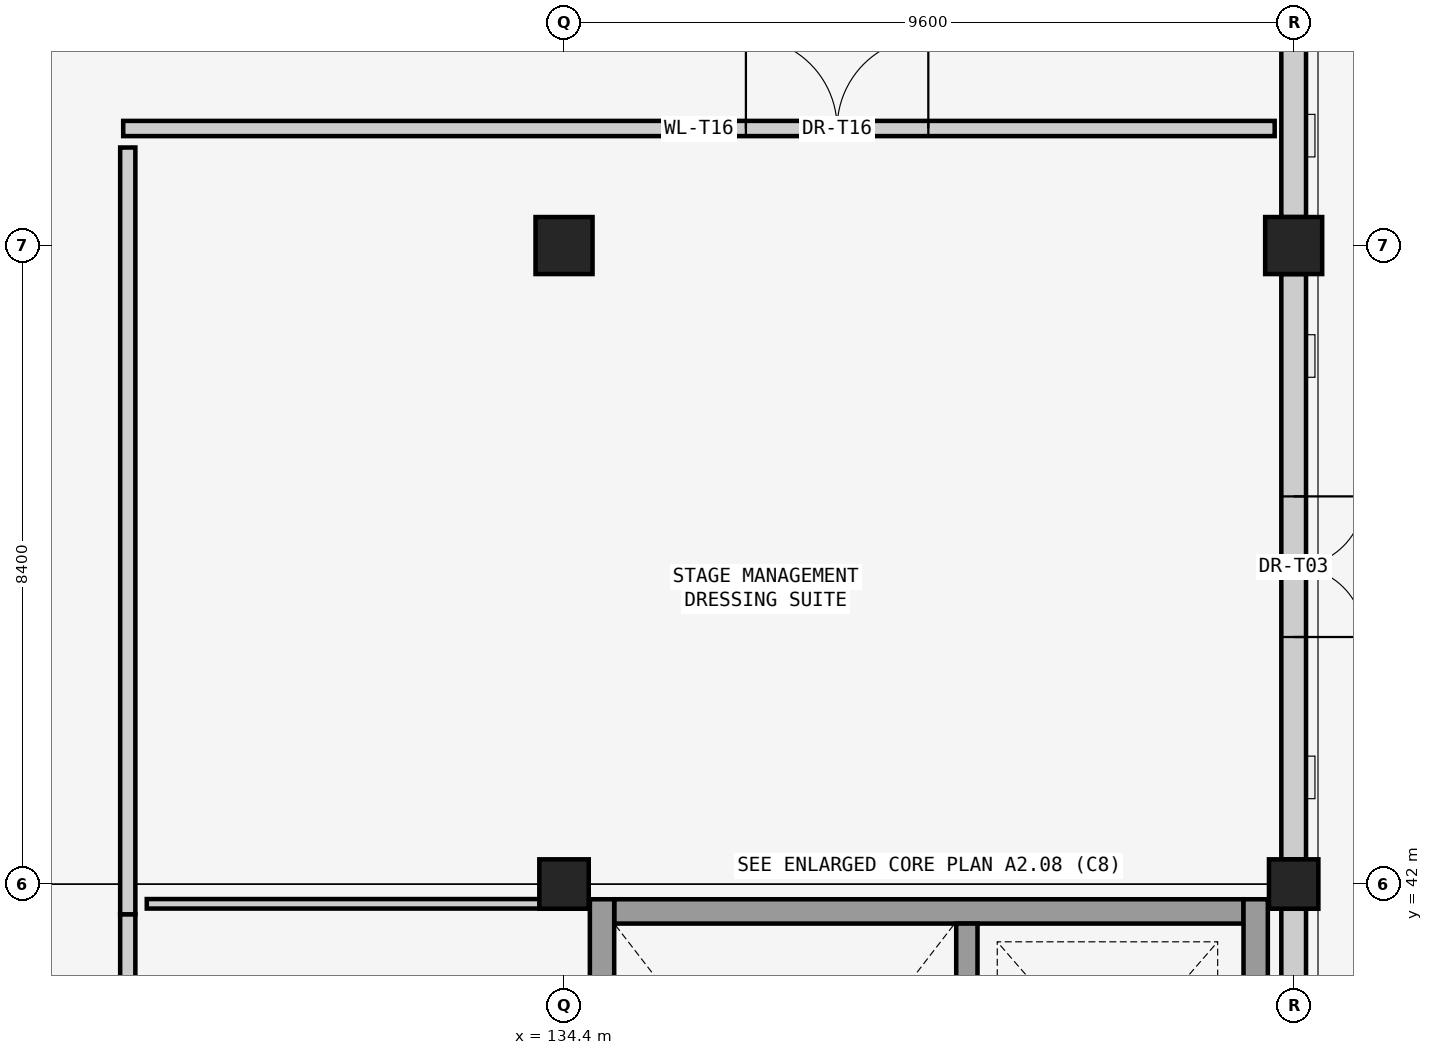
"""IFC4 building model, lengths in metres.
Left out: names, types, materials, properties, quantities, classifications, styles, units other than length and angle.
Written with IfcOpenShell. Run it as: python <this file> out.ifc"""

import sys

from ifc_helpers import new_model, si_unit, direction, frame, frame_2d, origin, origin_2d, place, context, subcontext, project, spatial, rectangle, extrude, element, fill, save


model = new_model("IFC4")
c1 = context("Model", 3, precision=1e-05, world=origin(), true_north=direction((0.0, 1.0)))
c2 = subcontext(c1, "Body", "Model", "MODEL_VIEW")
j1 = project(units=[si_unit("LENGTHUNIT", "METRE"), si_unit("PLANEANGLEUNIT", "RADIAN")], contexts=[c1])
p1 = place(None, origin())
s1 = spatial("IfcSite", under=j1, at=p1, CompositionType="ELEMENT")
p2 = place(p1, origin())
s2 = spatial("IfcBuilding", under=s1, at=p2, CompositionType="ELEMENT")
p3 = place(p2, frame((0.0, 0.0, 10.2)))
s3 = spatial("IfcBuildingStorey", under=s2, at=p3, CompositionType="ELEMENT", Elevation=10.2)
p4 = place(p3, frame((134.4, 42.0, 0.0), z_axis=(0.0, 0.0, 1.0), x_axis=(1.0, 0.0, 0.0)))
e1 = element("IfcColumn", 1, at=p4, inside=s3, PredefinedType="COLUMN", context=c2, shape_type="SweptSolid", body=[
    extrude(rectangle(XDim=0.65, YDim=0.65, at=origin_2d()), origin(), (0.0, 0.0, 1.0), 4.56),
])
p5 = place(p3, frame((134.4, 50.4, 0.0), z_axis=(0.0, 0.0, 1.0), x_axis=(1.0, 0.0, 0.0)))
e2 = element("IfcColumn", 2, at=p5, inside=s3, PredefinedType="COLUMN", context=c2, shape_type="SweptSolid", body=[
    extrude(rectangle(XDim=0.75, YDim=0.75, at=origin_2d()), origin(), (0.0, 0.0, 1.0), 4.56),
])
p6 = place(p3, frame((144.0, 42.0, 0.0), z_axis=(0.0, 0.0, 1.0), x_axis=(1.0, 0.0, 0.0)))
e3 = element("IfcColumn", 3, at=p6, inside=s3, PredefinedType="COLUMN", context=c2, shape_type="SweptSolid", body=[
    extrude(rectangle(XDim=0.65, YDim=0.65, at=origin_2d()), origin(), (0.0, 0.0, 1.0), 4.56),
])
p7 = place(p3, frame((144.0, 50.4, 0.0), z_axis=(0.0, 0.0, 1.0), x_axis=(1.0, 0.0, 0.0)))
e4 = element("IfcColumn", 4, at=p7, inside=s3, PredefinedType="COLUMN", context=c2, shape_type="SweptSolid", body=[
    extrude(rectangle(XDim=0.75, YDim=0.75, at=origin_2d()), origin(), (0.0, 0.0, 1.0), 4.56),
])
p8 = place(p3, frame((144.0, 41.675, 0.0), z_axis=(0.0, 0.0, 1.0), x_axis=(0.0, -1.0, 0.0)))
e5 = element("IfcWall", 5, at=p8, inside=s3, PredefinedType="SOLIDWALL", context=c2, shape_type="SweptSolid", body=[
    extrude(rectangle(XDim=7.75, YDim=0.325, at=frame_2d((3.875, 0.0))), origin(), (0.0, 0.0, 1.0), 4.208),
])
p9 = place(p3, frame((144.0, 50.025, 0.0), z_axis=(0.0, 0.0, 1.0), x_axis=(0.0, -1.0, 0.0)))
e6 = element("IfcWall", 6, at=p9, inside=s3, PredefinedType="SOLIDWALL", context=c2, shape_type="SweptSolid", body=[
    extrude(rectangle(XDim=7.7, YDim=0.325, at=frame_2d((3.85, 0.0))), origin(), (0.0, 0.0, 1.0), 4.208),
])
p10 = place(p9, frame((2.925, 0.0, 0.0)))
e7 = element("IfcOpeningElement", 7, at=p10, cuts=e6, PredefinedType="OPENING", context=c2, shape_type="SweptSolid", body=[
    extrude(rectangle(XDim=1.85, YDim=2.3, at=frame_2d((0.925, 1.15))), frame((0.0, 0.172, 0.0), z_axis=(0.0, -1.0, 0.0), x_axis=(1.0, 0.0, 0.0)), (0.0, 0.0, 1.0), 0.345),
])
p11 = place(p3, frame((144.0, 58.425, 0.0), z_axis=(0.0, 0.0, 1.0), x_axis=(0.0, -1.0, 0.0)))
e8 = element("IfcWall", 8, at=p11, inside=s3, PredefinedType="SOLIDWALL", context=c2, shape_type="SweptSolid", body=[
    extrude(rectangle(XDim=7.65, YDim=0.325, at=frame_2d((3.825, 0.0))), origin(), (0.0, 0.0, 1.0), 4.208),
])
p12 = place(p11, frame((2.9, 0.0, 0.0)))
e9 = element("IfcOpeningElement", 9, at=p12, cuts=e8, PredefinedType="OPENING", context=c2, shape_type="SweptSolid", body=[
    extrude(rectangle(XDim=1.85, YDim=2.3, at=frame_2d((0.925, 1.15))), frame((0.0, 0.172, 0.0), z_axis=(0.0, -1.0, 0.0), x_axis=(1.0, 0.0, 0.0)), (0.0, 0.0, 1.0), 0.345),
])
p13 = place(p3, frame((143.34, 41.64, 0.0), z_axis=(0.0, 0.0, 1.0), x_axis=(-1.0, 0.0, 0.0)))
e10 = element("IfcWall", 10, at=p13, inside=s3, PredefinedType="SHEAR", context=c2, shape_type="SweptSolid", body=[
    extrude(rectangle(XDim=8.28, YDim=0.32, at=frame_2d((4.14, 0.0))), origin(), (0.0, 0.0, 1.0), 4.54),
])
for number, where, z_axis, x_axis in (
    (11, (134.9, 41.8, 0.0), (0.0, 0.0, 1.0), (0.0, -1.0, 0.0)),
    (12, (143.5, 33.44, 0.0), (0.0, 0.0, 1.0), (0.0, 1.0, 0.0)),
):
    element("IfcWall", number, at=place(p3, frame(where, z_axis=z_axis, x_axis=x_axis)), inside=s3, PredefinedType="SHEAR", context=c2, shape_type="SweptSolid", body=[
        extrude(rectangle(XDim=8.36, YDim=0.32, at=frame_2d((4.18, 0.0))), origin(), (0.0, 0.0, 1.0), 4.54),
    ])
p14 = place(p3, frame((139.7, 33.76, 0.0), z_axis=(0.0, 0.0, 1.0), x_axis=(0.0, 1.0, 0.0)))
e13 = element("IfcWall", 13, at=p14, inside=s3, PredefinedType="SHEAR", context=c2, shape_type="SweptSolid", body=[
    extrude(rectangle(XDim=7.72, YDim=0.28, at=frame_2d((3.86, 0.0))), origin(), (0.0, 0.0, 1.0), 4.54),
])
p15 = place(p3, frame((128.6, 51.94, 0.0), z_axis=(0.0, 0.0, 1.0), x_axis=(1.0, 0.0, 0.0)))
e14 = element("IfcWall", 14, at=p15, inside=s3, PredefinedType="SOLIDWALL", context=c2, shape_type="SweptSolid", body=[
    extrude(rectangle(XDim=15.15, YDim=0.2, at=frame_2d((7.575, 0.0))), origin(), (0.0, 0.0, 1.0), 4.48),
])
p16 = place(p15, frame((8.193, 0.0, 0.0)))
e15 = element("IfcOpeningElement", 15, at=p16, cuts=e14, PredefinedType="OPENING", context=c2, shape_type="SweptSolid", body=[
    extrude(rectangle(XDim=2.4, YDim=2.8, at=frame_2d((1.2, 1.4))), frame((0.0, 0.11, 0.0), z_axis=(0.0, -1.0, 0.0), x_axis=(1.0, 0.0, 0.0)), (0.0, 0.0, 1.0), 0.22),
])
p17 = place(p3, frame((128.66, 41.6, 0.0), z_axis=(0.0, 0.0, 1.0), x_axis=(0.0, 1.0, 0.0)))
e16 = element("IfcWall", 16, at=p17, inside=s3, PredefinedType="SOLIDWALL", context=c2, shape_type="SweptSolid", body=[
    extrude(rectangle(XDim=10.09, YDim=0.2, at=frame_2d((5.045, 0.0))), origin(), (0.0, 0.0, 1.0), 4.48),
])
p18 = place(p3, frame((128.66, 33.6, 0.0), z_axis=(0.0, 0.0, 1.0), x_axis=(0.0, 1.0, 0.0)))
e17 = element("IfcWall", 17, at=p18, inside=s3, PredefinedType="SOLIDWALL", context=c2, shape_type="SweptSolid", body=[
    extrude(rectangle(XDim=8.0, YDim=0.2, at=frame_2d((4.0, 0.0))), origin(), (0.0, 0.0, 1.0), 4.48),
])
p19 = place(p18, frame((3.525, 0.0, 0.0)))
e18 = element("IfcOpeningElement", 18, at=p19, cuts=e17, PredefinedType="OPENING", context=c2, shape_type="SweptSolid", body=[
    extrude(rectangle(XDim=0.95, YDim=2.15, at=frame_2d((0.475, 1.075))), frame((0.0, 0.11, 0.0), z_axis=(0.0, -1.0, 0.0), x_axis=(1.0, 0.0, 0.0)), (0.0, 0.0, 1.0), 0.22),
])
p20 = place(p3, frame((128.91, 41.74, 0.0), z_axis=(0.0, 0.0, 1.0), x_axis=(1.0, 0.0, 0.0)))
e19 = element("IfcWall", 19, at=p20, inside=s3, PredefinedType="PARTITIONING", context=c2, shape_type="SweptSolid", body=[
    extrude(rectangle(XDim=5.74, YDim=0.125, at=frame_2d((2.87, 0.0))), origin(), (0.0, 0.0, 1.0), 4.51),
])
p21 = place(p10, origin())
e20 = element("IfcDoor", 20, at=p21, inside=s3, OperationType="DOUBLE_DOOR_SINGLE_SWING", PredefinedType="DOOR", context=c2, shape_type="SweptSolid", body=[
    extrude(rectangle(XDim=1.85, YDim=2.3, at=frame_2d((0.925, 1.15))), frame((0.0, 0.025, 0.0), z_axis=(0.0, -1.0, 0.0), x_axis=(1.0, 0.0, 0.0)), (0.0, 0.0, 1.0), 0.05),
])
fill(e7, e20)
p22 = place(p16, origin())
e21 = element("IfcDoor", 21, at=p22, inside=s3, OperationType="DOUBLE_SWING_LEFT", PredefinedType="DOOR", context=c2, shape_type="SweptSolid", body=[
    extrude(rectangle(XDim=2.4, YDim=2.8, at=frame_2d((1.2, 1.4))), frame((0.0, 0.025, 0.0), z_axis=(0.0, -1.0, 0.0), x_axis=(1.0, 0.0, 0.0)), (0.0, 0.0, 1.0), 0.05),
])
fill(e15, e21)
save(model, sys.argv[1])
